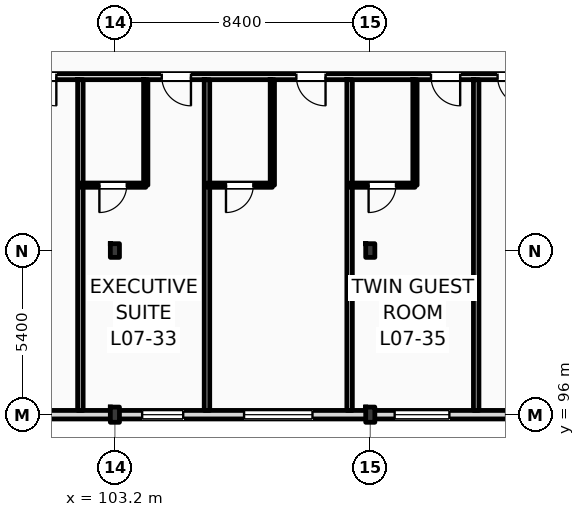
"""IFC4 building model, lengths in metres.
Left out: names, types, materials, properties, quantities, classifications, styles, units other than length and angle.
Written with IfcOpenShell. Run it as: python <this file> out.ifc"""

import sys

from ifc_helpers import new_model, si_unit, direction, frame, frame_2d, origin, origin_2d, place, context, subcontext, project, spatial, rectangle, i_section, extrude, element, fill, save


model = new_model("IFC4")
c1 = context("Model", 3, precision=1e-05, world=origin(), true_north=direction((0.0, 1.0)))
c2 = subcontext(c1, "Body", "Model", "MODEL_VIEW")
j1 = project(units=[si_unit("LENGTHUNIT", "METRE"), si_unit("PLANEANGLEUNIT", "RADIAN")], contexts=[c1])
p1 = place(None, origin())
s1 = spatial("IfcSite", under=j1, at=p1, CompositionType="ELEMENT")
p2 = place(p1, origin())
s2 = spatial("IfcBuilding", under=s1, at=p2, CompositionType="ELEMENT")
p3 = place(p2, frame((0.0, 0.0, 31.8)))
s3 = spatial("IfcBuildingStorey", under=s2, at=p3, CompositionType="ELEMENT", Elevation=31.8)
p4 = place(p3, frame((103.2, 96.0, 0.0), z_axis=(0.0, 0.0, 1.0), x_axis=(1.0, 0.0, 0.0)))
e1 = element("IfcColumn", 1, at=p4, inside=s3, PredefinedType="COLUMN", context=c2, shape_type="SweptSolid", body=[
    extrude(i_section(OverallWidth=0.3, OverallDepth=0.5, WebThickness=0.014, FlangeThickness=0.028, FilletRadius=0.027, at=origin_2d()), origin(), (0.0, 0.0, 1.0), 3.6),
])
p5 = place(p3, frame((103.2, 101.4, 0.0), z_axis=(0.0, 0.0, 1.0), x_axis=(1.0, 0.0, 0.0)))
e2 = element("IfcColumn", 2, at=p5, inside=s3, PredefinedType="COLUMN", context=c2, shape_type="SweptSolid", body=[
    extrude(i_section(OverallWidth=0.3, OverallDepth=0.45, WebThickness=0.014, FlangeThickness=0.026, FilletRadius=0.027, at=origin_2d()), origin(), (0.0, 0.0, 1.0), 3.6),
])
p6 = place(p3, frame((111.6, 96.0, 0.0), z_axis=(0.0, 0.0, 1.0), x_axis=(1.0, 0.0, 0.0)))
e3 = element("IfcColumn", 3, at=p6, inside=s3, PredefinedType="COLUMN", context=c2, shape_type="SweptSolid", body=[
    extrude(i_section(OverallWidth=0.3, OverallDepth=0.5, WebThickness=0.014, FlangeThickness=0.028, FilletRadius=0.027, at=origin_2d()), origin(), (0.0, 0.0, 1.0), 3.6),
])
p7 = place(p3, frame((111.6, 101.4, 0.0), z_axis=(0.0, 0.0, 1.0), x_axis=(1.0, 0.0, 0.0)))
e4 = element("IfcColumn", 4, at=p7, inside=s3, PredefinedType="COLUMN", context=c2, shape_type="SweptSolid", body=[
    extrude(i_section(OverallWidth=0.3, OverallDepth=0.45, WebThickness=0.014, FlangeThickness=0.026, FilletRadius=0.027, at=origin_2d()), origin(), (0.0, 0.0, 1.0), 3.6),
])
p8 = place(p3, frame((25.2, 96.0, 0.0), z_axis=(0.0, 0.0, 1.0), x_axis=(1.0, 0.0, 0.0)))
e5 = element("IfcWall", 5, at=p8, inside=s3, PredefinedType="STANDARD", context=c2, shape_type="SweptSolid", body=[
    extrude(rectangle(XDim=94.8, YDim=0.28, at=frame_2d((47.4, 0.0))), origin(), (0.0, 0.0, 1.0), 2.72),
])
p9 = place(p8, frame((16.394, 0.0, 0.9)))
e6 = element("IfcOpeningElement", 6, at=p9, cuts=e5, PredefinedType="OPENING", context=c2, shape_type="SweptSolid", body=[
    extrude(rectangle(XDim=2.0, YDim=1.64, at=frame_2d((1.0, 0.82))), frame((0.0, 0.15, 0.0), z_axis=(0.0, -1.0, 0.0), x_axis=(1.0, 0.0, 0.0)), (0.0, 0.0, 1.0), 0.3),
])
p10 = place(p8, frame((20.207, 0.0, 0.9)))
e7 = element("IfcOpeningElement", 7, at=p10, cuts=e5, PredefinedType="OPENING", context=c2, shape_type="SweptSolid", body=[
    extrude(rectangle(XDim=2.3, YDim=1.64, at=frame_2d((1.15, 0.82))), frame((0.0, 0.15, 0.0), z_axis=(0.0, -1.0, 0.0), x_axis=(1.0, 0.0, 0.0)), (0.0, 0.0, 1.0), 0.3),
])
p11 = place(p8, frame((24.287, 0.0, 0.9)))
e8 = element("IfcOpeningElement", 8, at=p11, cuts=e5, PredefinedType="OPENING", context=c2, shape_type="SweptSolid", body=[
    extrude(rectangle(XDim=2.358, YDim=1.64, at=frame_2d((1.179, 0.82))), frame((0.0, 0.15, 0.0), z_axis=(0.0, -1.0, 0.0), x_axis=(1.0, 0.0, 0.0)), (0.0, 0.0, 1.0), 0.3),
])
p12 = place(p8, frame((27.665, 0.0, 0.9)))
e9 = element("IfcOpeningElement", 9, at=p12, cuts=e5, PredefinedType="OPENING", context=c2, shape_type="SweptSolid", body=[
    extrude(rectangle(XDim=1.8, YDim=1.64, at=frame_2d((0.9, 0.82))), frame((0.0, 0.15, 0.0), z_axis=(0.0, -1.0, 0.0), x_axis=(1.0, 0.0, 0.0)), (0.0, 0.0, 1.0), 0.3),
])
p13 = place(p8, frame((32.103, 0.0, 0.9)))
e10 = element("IfcOpeningElement", 10, at=p13, cuts=e5, PredefinedType="OPENING", context=c2, shape_type="SweptSolid", body=[
    extrude(rectangle(XDim=2.359, YDim=1.64, at=frame_2d((1.179, 0.82))), frame((0.0, 0.15, 0.0), z_axis=(0.0, -1.0, 0.0), x_axis=(1.0, 0.0, 0.0)), (0.0, 0.0, 1.0), 0.3),
])
p14 = place(p8, frame((36.336, 0.0, 0.9)))
e11 = element("IfcOpeningElement", 11, at=p14, cuts=e5, PredefinedType="OPENING", context=c2, shape_type="SweptSolid", body=[
    extrude(rectangle(XDim=1.2, YDim=1.64, at=frame_2d((0.6, 0.82))), frame((0.0, 0.15, 0.0), z_axis=(0.0, -1.0, 0.0), x_axis=(1.0, 0.0, 0.0)), (0.0, 0.0, 1.0), 0.3),
])
p15 = place(p8, frame((56.177, 0.0, 0.9)))
e12 = element("IfcOpeningElement", 12, at=p15, cuts=e5, PredefinedType="OPENING", context=c2, shape_type="SweptSolid", body=[
    extrude(rectangle(XDim=1.35, YDim=1.64, at=frame_2d((0.675, 0.82))), frame((0.0, 0.15, 0.0), z_axis=(0.0, -1.0, 0.0), x_axis=(1.0, 0.0, 0.0)), (0.0, 0.0, 1.0), 0.3),
])
p16 = place(p8, frame((60.086, 0.0, 0.9)))
e13 = element("IfcOpeningElement", 13, at=p16, cuts=e5, PredefinedType="OPENING", context=c2, shape_type="SweptSolid", body=[
    extrude(rectangle(XDim=1.5, YDim=1.64, at=frame_2d((0.75, 0.82))), frame((0.0, 0.15, 0.0), z_axis=(0.0, -1.0, 0.0), x_axis=(1.0, 0.0, 0.0)), (0.0, 0.0, 1.0), 0.3),
])
p17 = place(p8, frame((64.838, 0.0, 0.9)))
e14 = element("IfcOpeningElement", 14, at=p17, cuts=e5, PredefinedType="OPENING", context=c2, shape_type="SweptSolid", body=[
    extrude(rectangle(XDim=1.65, YDim=1.64, at=frame_2d((0.825, 0.82))), frame((0.0, 0.15, 0.0), z_axis=(0.0, -1.0, 0.0), x_axis=(1.0, 0.0, 0.0)), (0.0, 0.0, 1.0), 0.3),
])
p18 = place(p8, frame((68.419, 0.0, 0.9)))
e15 = element("IfcOpeningElement", 15, at=p18, cuts=e5, PredefinedType="OPENING", context=c2, shape_type="SweptSolid", body=[
    extrude(rectangle(XDim=0.9, YDim=1.64, at=frame_2d((0.45, 0.82))), frame((0.0, 0.15, 0.0), z_axis=(0.0, -1.0, 0.0), x_axis=(1.0, 0.0, 0.0)), (0.0, 0.0, 1.0), 0.3),
])
p19 = place(p8, frame((73.544, 0.0, 0.9)))
e16 = element("IfcOpeningElement", 16, at=p19, cuts=e5, PredefinedType="OPENING", context=c2, shape_type="SweptSolid", body=[
    extrude(rectangle(XDim=1.95, YDim=1.64, at=frame_2d((0.975, 0.82))), frame((0.0, 0.15, 0.0), z_axis=(0.0, -1.0, 0.0), x_axis=(1.0, 0.0, 0.0)), (0.0, 0.0, 1.0), 0.3),
])
p20 = place(p8, frame((78.897, 0.0, 0.9)))
e17 = element("IfcOpeningElement", 17, at=p20, cuts=e5, PredefinedType="OPENING", context=c2, shape_type="SweptSolid", body=[
    extrude(rectangle(XDim=1.35, YDim=1.64, at=frame_2d((0.675, 0.82))), frame((0.0, 0.15, 0.0), z_axis=(0.0, -1.0, 0.0), x_axis=(1.0, 0.0, 0.0)), (0.0, 0.0, 1.0), 0.3),
])
p21 = place(p8, frame((82.249, 0.0, 0.9)))
e18 = element("IfcOpeningElement", 18, at=p21, cuts=e5, PredefinedType="OPENING", context=c2, shape_type="SweptSolid", body=[
    extrude(rectangle(XDim=2.25, YDim=1.64, at=frame_2d((1.125, 0.82))), frame((0.0, 0.15, 0.0), z_axis=(0.0, -1.0, 0.0), x_axis=(1.0, 0.0, 0.0)), (0.0, 0.0, 1.0), 0.3),
])
p22 = place(p8, frame((87.202, 0.0, 0.9)))
e19 = element("IfcOpeningElement", 19, at=p22, cuts=e5, PredefinedType="OPENING", context=c2, shape_type="SweptSolid", body=[
    extrude(rectangle(XDim=1.8, YDim=1.64, at=frame_2d((0.9, 0.82))), frame((0.0, 0.15, 0.0), z_axis=(0.0, -1.0, 0.0), x_axis=(1.0, 0.0, 0.0)), (0.0, 0.0, 1.0), 0.3),
])
p23 = place(p8, frame((90.867, 0.0, 0.9)))
e20 = element("IfcOpeningElement", 20, at=p23, cuts=e5, PredefinedType="OPENING", context=c2, shape_type="SweptSolid", body=[
    extrude(rectangle(XDim=2.55, YDim=1.64, at=frame_2d((1.275, 0.82))), frame((0.0, 0.15, 0.0), z_axis=(0.0, -1.0, 0.0), x_axis=(1.0, 0.0, 0.0)), (0.0, 0.0, 1.0), 0.3),
])
p24 = place(p3, frame((79.76, 107.12, 0.0), z_axis=(0.0, 0.0, 1.0), x_axis=(1.0, 0.0, 0.0)))
e21 = element("IfcWall", 21, at=p24, inside=s3, PredefinedType="PARTITIONING", context=c2, shape_type="SweptSolid", body=[
    extrude(rectangle(XDim=40.1, YDim=0.2, at=frame_2d((20.05, 0.0))), origin(), (0.0, 0.0, 1.0), 3.36),
])
p25 = place(p24, frame((2.887, 0.0, 0.0)))
e22 = element("IfcOpeningElement", 22, at=p25, cuts=e21, PredefinedType="OPENING", context=c2, shape_type="SweptSolid", body=[
    extrude(rectangle(XDim=0.96, YDim=2.2, at=frame_2d((0.48, 1.1))), frame((0.0, 0.11, 0.0), z_axis=(0.0, -1.0, 0.0), x_axis=(1.0, 0.0, 0.0)), (0.0, 0.0, 1.0), 0.22),
])
p26 = place(p24, frame((5.121, 0.0, 0.0)))
e23 = element("IfcOpeningElement", 23, at=p26, cuts=e21, PredefinedType="OPENING", context=c2, shape_type="SweptSolid", body=[
    extrude(rectangle(XDim=0.96, YDim=2.2, at=frame_2d((0.48, 1.1))), frame((0.0, 0.11, 0.0), z_axis=(0.0, -1.0, 0.0), x_axis=(1.0, 0.0, 0.0)), (0.0, 0.0, 1.0), 0.22),
])
p27 = place(p24, frame((11.698, 0.0, 0.0)))
e24 = element("IfcOpeningElement", 24, at=p27, cuts=e21, PredefinedType="OPENING", context=c2, shape_type="SweptSolid", body=[
    extrude(rectangle(XDim=0.96, YDim=2.2, at=frame_2d((0.48, 1.1))), frame((0.0, 0.11, 0.0), z_axis=(0.0, -1.0, 0.0), x_axis=(1.0, 0.0, 0.0)), (0.0, 0.0, 1.0), 0.22),
])
p28 = place(p24, frame((13.976, 0.0, 0.0)))
e25 = element("IfcOpeningElement", 25, at=p28, cuts=e21, PredefinedType="OPENING", context=c2, shape_type="SweptSolid", body=[
    extrude(rectangle(XDim=0.96, YDim=2.2, at=frame_2d((0.48, 1.1))), frame((0.0, 0.11, 0.0), z_axis=(0.0, -1.0, 0.0), x_axis=(1.0, 0.0, 0.0)), (0.0, 0.0, 1.0), 0.22),
])
p29 = place(p24, frame((20.554, 0.0, 0.0)))
e26 = element("IfcOpeningElement", 26, at=p29, cuts=e21, PredefinedType="OPENING", context=c2, shape_type="SweptSolid", body=[
    extrude(rectangle(XDim=0.96, YDim=2.2, at=frame_2d((0.48, 1.1))), frame((0.0, 0.11, 0.0), z_axis=(0.0, -1.0, 0.0), x_axis=(1.0, 0.0, 0.0)), (0.0, 0.0, 1.0), 0.22),
])
p30 = place(p24, frame((24.982, 0.0, 0.0)))
e27 = element("IfcOpeningElement", 27, at=p30, cuts=e21, PredefinedType="OPENING", context=c2, shape_type="SweptSolid", body=[
    extrude(rectangle(XDim=0.96, YDim=2.2, at=frame_2d((0.48, 1.1))), frame((0.0, 0.11, 0.0), z_axis=(0.0, -1.0, 0.0), x_axis=(1.0, 0.0, 0.0)), (0.0, 0.0, 1.0), 0.22),
])
p31 = place(p24, frame((29.409, 0.0, 0.0)))
e28 = element("IfcOpeningElement", 28, at=p31, cuts=e21, PredefinedType="OPENING", context=c2, shape_type="SweptSolid", body=[
    extrude(rectangle(XDim=0.96, YDim=2.2, at=frame_2d((0.48, 1.1))), frame((0.0, 0.11, 0.0), z_axis=(0.0, -1.0, 0.0), x_axis=(1.0, 0.0, 0.0)), (0.0, 0.0, 1.0), 0.22),
])
p32 = place(p24, frame((33.837, 0.0, 0.0)))
e29 = element("IfcOpeningElement", 29, at=p32, cuts=e21, PredefinedType="OPENING", context=c2, shape_type="SweptSolid", body=[
    extrude(rectangle(XDim=0.96, YDim=2.2, at=frame_2d((0.48, 1.1))), frame((0.0, 0.11, 0.0), z_axis=(0.0, -1.0, 0.0), x_axis=(1.0, 0.0, 0.0)), (0.0, 0.0, 1.0), 0.22),
])
p33 = place(p24, frame((36.027, 0.0, 0.0)))
e30 = element("IfcOpeningElement", 30, at=p33, cuts=e21, PredefinedType="OPENING", context=c2, shape_type="SweptSolid", body=[
    extrude(rectangle(XDim=0.96, YDim=2.2, at=frame_2d((0.48, 1.1))), frame((0.0, 0.11, 0.0), z_axis=(0.0, -1.0, 0.0), x_axis=(1.0, 0.0, 0.0)), (0.0, 0.0, 1.0), 0.22),
])
p34 = place(p3, frame((102.065, 96.14, 0.0), z_axis=(0.0, 0.0, 1.0), x_axis=(0.0, 1.0, 0.0)))
e31 = element("IfcWall", 31, at=p34, inside=s3, PredefinedType="PARTITIONING", context=c2, shape_type="SweptSolid", body=[
    extrude(rectangle(XDim=10.88, YDim=0.18, at=frame_2d((5.44, 0.0))), origin(), (0.0, 0.0, 1.0), 3.36),
])
p35 = place(p3, frame((106.229, 96.14, 0.0), z_axis=(0.0, 0.0, 1.0), x_axis=(0.0, 1.0, 0.0)))
e32 = element("IfcWall", 32, at=p35, inside=s3, PredefinedType="PARTITIONING", context=c2, shape_type="SweptSolid", body=[
    extrude(rectangle(XDim=10.88, YDim=0.18, at=frame_2d((5.44, 0.0))), origin(), (0.0, 0.0, 1.0), 2.97),
])
p36 = place(p3, frame((104.215, 103.55, 0.0), z_axis=(0.0, 0.0, 1.0), x_axis=(0.0, 1.0, 0.0)))
e33 = element("IfcWall", 33, at=p36, inside=s3, PredefinedType="PARTITIONING", context=c2, shape_type="SweptSolid", body=[
    extrude(rectangle(XDim=3.47, YDim=0.14, at=frame_2d((1.735, 0.0))), origin(), (0.0, 0.0, 1.0), 3.36),
])
p37 = place(p3, frame((102.065, 103.55, 0.0), z_axis=(0.0, 0.0, 1.0), x_axis=(1.0, 0.0, 0.0)))
e34 = element("IfcWall", 34, at=p37, inside=s3, PredefinedType="PARTITIONING", context=c2, shape_type="SweptSolid", body=[
    extrude(rectangle(XDim=2.15, YDim=0.14, at=frame_2d((1.075, 0.0))), origin(), (0.0, 0.0, 1.0), 3.36),
])
p38 = place(p37, frame((0.625, 0.0, 0.0)))
e35 = element("IfcOpeningElement", 35, at=p38, cuts=e34, PredefinedType="OPENING", context=c2, shape_type="SweptSolid", body=[
    extrude(rectangle(XDim=0.9, YDim=2.1, at=frame_2d((0.45, 1.05))), frame((0.0, 0.08, 0.0), z_axis=(0.0, -1.0, 0.0), x_axis=(1.0, 0.0, 0.0)), (0.0, 0.0, 1.0), 0.16),
])
p39 = place(p3, frame((110.92, 96.14, 0.0), z_axis=(0.0, 0.0, 1.0), x_axis=(0.0, 1.0, 0.0)))
e36 = element("IfcWall", 36, at=p39, inside=s3, PredefinedType="PARTITIONING", context=c2, shape_type="SweptSolid", body=[
    extrude(rectangle(XDim=10.88, YDim=0.18, at=frame_2d((5.44, 0.0))), origin(), (0.0, 0.0, 1.0), 3.36),
])
p40 = place(p3, frame((108.379, 103.55, 0.0), z_axis=(0.0, 0.0, 1.0), x_axis=(0.0, 1.0, 0.0)))
e37 = element("IfcWall", 37, at=p40, inside=s3, PredefinedType="PARTITIONING", context=c2, shape_type="SweptSolid", body=[
    extrude(rectangle(XDim=3.47, YDim=0.14, at=frame_2d((1.735, 0.0))), origin(), (0.0, 0.0, 1.0), 3.36),
])
p41 = place(p3, frame((106.229, 103.55, 0.0), z_axis=(0.0, 0.0, 1.0), x_axis=(1.0, 0.0, 0.0)))
e38 = element("IfcWall", 38, at=p41, inside=s3, PredefinedType="PARTITIONING", context=c2, shape_type="SweptSolid", body=[
    extrude(rectangle(XDim=2.15, YDim=0.14, at=frame_2d((1.075, 0.0))), origin(), (0.0, 0.0, 1.0), 3.36),
])
p42 = place(p41, frame((0.625, 0.0, 0.0)))
e39 = element("IfcOpeningElement", 39, at=p42, cuts=e38, PredefinedType="OPENING", context=c2, shape_type="SweptSolid", body=[
    extrude(rectangle(XDim=0.9, YDim=2.1, at=frame_2d((0.45, 1.05))), frame((0.0, 0.08, 0.0), z_axis=(0.0, -1.0, 0.0), x_axis=(1.0, 0.0, 0.0)), (0.0, 0.0, 1.0), 0.16),
])
p43 = place(p3, frame((115.084, 96.14, 0.0), z_axis=(0.0, 0.0, 1.0), x_axis=(0.0, 1.0, 0.0)))
e40 = element("IfcWall", 40, at=p43, inside=s3, PredefinedType="PARTITIONING", context=c2, shape_type="SweptSolid", body=[
    extrude(rectangle(XDim=10.88, YDim=0.18, at=frame_2d((5.44, 0.0))), origin(), (0.0, 0.0, 1.0), 3.36),
])
p44 = place(p3, frame((113.07, 103.55, 0.0), z_axis=(0.0, 0.0, 1.0), x_axis=(0.0, 1.0, 0.0)))
e41 = element("IfcWall", 41, at=p44, inside=s3, PredefinedType="PARTITIONING", context=c2, shape_type="SweptSolid", body=[
    extrude(rectangle(XDim=3.47, YDim=0.14, at=frame_2d((1.735, 0.0))), origin(), (0.0, 0.0, 1.0), 3.36),
])
p45 = place(p3, frame((110.92, 103.55, 0.0), z_axis=(0.0, 0.0, 1.0), x_axis=(1.0, 0.0, 0.0)))
e42 = element("IfcWall", 42, at=p45, inside=s3, PredefinedType="PARTITIONING", context=c2, shape_type="SweptSolid", body=[
    extrude(rectangle(XDim=2.15, YDim=0.14, at=frame_2d((1.075, 0.0))), origin(), (0.0, 0.0, 1.0), 3.36),
])
p46 = place(p45, frame((0.625, 0.0, 0.0)))
e43 = element("IfcOpeningElement", 43, at=p46, cuts=e42, PredefinedType="OPENING", context=c2, shape_type="SweptSolid", body=[
    extrude(rectangle(XDim=0.9, YDim=2.1, at=frame_2d((0.45, 1.05))), frame((0.0, 0.08, 0.0), z_axis=(0.0, -1.0, 0.0), x_axis=(1.0, 0.0, 0.0)), (0.0, 0.0, 1.0), 0.16),
])
p47 = place(p20, origin())
e44 = element("IfcWindow", 44, at=p47, inside=s3, PartitioningType="DOUBLE_PANEL_VERTICAL", PredefinedType="WINDOW", context=c2, shape_type="SweptSolid", body=[
    extrude(rectangle(XDim=1.35, YDim=1.64, at=frame_2d((0.675, 0.82))), frame((0.0, 0.03, 0.0), z_axis=(0.0, -1.0, 0.0), x_axis=(1.0, 0.0, 0.0)), (0.0, 0.0, 1.0), 0.06),
])
fill(e17, e44)
p48 = place(p21, origin())
e45 = element("IfcWindow", 45, at=p48, inside=s3, PartitioningType="DOUBLE_PANEL_VERTICAL", PredefinedType="WINDOW", context=c2, shape_type="SweptSolid", body=[
    extrude(rectangle(XDim=2.25, YDim=1.64, at=frame_2d((1.125, 0.82))), frame((0.0, 0.03, 0.0), z_axis=(0.0, -1.0, 0.0), x_axis=(1.0, 0.0, 0.0)), (0.0, 0.0, 1.0), 0.06),
])
fill(e18, e45)
p49 = place(p22, origin())
e46 = element("IfcWindow", 46, at=p49, inside=s3, PartitioningType="DOUBLE_PANEL_VERTICAL", PredefinedType="WINDOW", context=c2, shape_type="SweptSolid", body=[
    extrude(rectangle(XDim=1.8, YDim=1.64, at=frame_2d((0.9, 0.82))), frame((0.0, 0.03, 0.0), z_axis=(0.0, -1.0, 0.0), x_axis=(1.0, 0.0, 0.0)), (0.0, 0.0, 1.0), 0.06),
])
fill(e19, e46)
p50 = place(p29, frame((0.96, 0.0, 0.0), z_axis=(0.0, 0.0, 1.0), x_axis=(-1.0, 0.0, 0.0)))
e47 = element("IfcDoor", 47, at=p50, inside=s3, OperationType="SINGLE_SWING_RIGHT", PredefinedType="DOOR", context=c2, shape_type="SweptSolid", body=[
    extrude(rectangle(XDim=0.96, YDim=2.2, at=frame_2d((0.48, 1.1))), frame((0.0, 0.025, 0.0), z_axis=(0.0, -1.0, 0.0), x_axis=(1.0, 0.0, 0.0)), (0.0, 0.0, 1.0), 0.05),
])
fill(e26, e47)
p51 = place(p30, frame((0.96, 0.0, 0.0), z_axis=(0.0, 0.0, 1.0), x_axis=(-1.0, 0.0, 0.0)))
e48 = element("IfcDoor", 48, at=p51, inside=s3, OperationType="SINGLE_SWING_RIGHT", PredefinedType="DOOR", context=c2, shape_type="SweptSolid", body=[
    extrude(rectangle(XDim=0.96, YDim=2.2, at=frame_2d((0.48, 1.1))), frame((0.0, 0.025, 0.0), z_axis=(0.0, -1.0, 0.0), x_axis=(1.0, 0.0, 0.0)), (0.0, 0.0, 1.0), 0.05),
])
fill(e27, e48)
p52 = place(p38, frame((0.9, 0.0, 0.0), z_axis=(0.0, 0.0, 1.0), x_axis=(-1.0, 0.0, 0.0)))
e49 = element("IfcDoor", 49, at=p52, inside=s3, OperationType="SINGLE_SWING_LEFT", PredefinedType="DOOR", context=c2, shape_type="SweptSolid", body=[
    extrude(rectangle(XDim=0.9, YDim=2.1, at=frame_2d((0.45, 1.05))), frame((0.0, 0.025, 0.0), z_axis=(0.0, -1.0, 0.0), x_axis=(1.0, 0.0, 0.0)), (0.0, 0.0, 1.0), 0.05),
])
fill(e35, e49)
p53 = place(p31, frame((0.96, 0.0, 0.0), z_axis=(0.0, 0.0, 1.0), x_axis=(-1.0, 0.0, 0.0)))
e50 = element("IfcDoor", 50, at=p53, inside=s3, OperationType="SINGLE_SWING_RIGHT", PredefinedType="DOOR", context=c2, shape_type="SweptSolid", body=[
    extrude(rectangle(XDim=0.96, YDim=2.2, at=frame_2d((0.48, 1.1))), frame((0.0, 0.025, 0.0), z_axis=(0.0, -1.0, 0.0), x_axis=(1.0, 0.0, 0.0)), (0.0, 0.0, 1.0), 0.05),
])
fill(e28, e50)
p54 = place(p42, frame((0.9, 0.0, 0.0), z_axis=(0.0, 0.0, 1.0), x_axis=(-1.0, 0.0, 0.0)))
e51 = element("IfcDoor", 51, at=p54, inside=s3, OperationType="SINGLE_SWING_LEFT", PredefinedType="DOOR", context=c2, shape_type="SweptSolid", body=[
    extrude(rectangle(XDim=0.9, YDim=2.1, at=frame_2d((0.45, 1.05))), frame((0.0, 0.025, 0.0), z_axis=(0.0, -1.0, 0.0), x_axis=(1.0, 0.0, 0.0)), (0.0, 0.0, 1.0), 0.05),
])
fill(e39, e51)
p55 = place(p32, frame((0.96, 0.0, 0.0), z_axis=(0.0, 0.0, 1.0), x_axis=(-1.0, 0.0, 0.0)))
e52 = element("IfcDoor", 52, at=p55, inside=s3, OperationType="SINGLE_SWING_RIGHT", PredefinedType="DOOR", context=c2, shape_type="SweptSolid", body=[
    extrude(rectangle(XDim=0.96, YDim=2.2, at=frame_2d((0.48, 1.1))), frame((0.0, 0.025, 0.0), z_axis=(0.0, -1.0, 0.0), x_axis=(1.0, 0.0, 0.0)), (0.0, 0.0, 1.0), 0.05),
])
fill(e29, e52)
p56 = place(p46, frame((0.9, 0.0, 0.0), z_axis=(0.0, 0.0, 1.0), x_axis=(-1.0, 0.0, 0.0)))
e53 = element("IfcDoor", 53, at=p56, inside=s3, OperationType="SINGLE_SWING_LEFT", PredefinedType="DOOR", context=c2, shape_type="SweptSolid", body=[
    extrude(rectangle(XDim=0.9, YDim=2.1, at=frame_2d((0.45, 1.05))), frame((0.0, 0.025, 0.0), z_axis=(0.0, -1.0, 0.0), x_axis=(1.0, 0.0, 0.0)), (0.0, 0.0, 1.0), 0.05),
])
fill(e43, e53)
p57 = place(p33, frame((0.96, 0.0, 0.0), z_axis=(0.0, 0.0, 1.0), x_axis=(-1.0, 0.0, 0.0)))
e54 = element("IfcDoor", 54, at=p57, inside=s3, OperationType="SINGLE_SWING_RIGHT", PredefinedType="DOOR", context=c2, shape_type="SweptSolid", body=[
    extrude(rectangle(XDim=0.96, YDim=2.2, at=frame_2d((0.48, 1.1))), frame((0.0, 0.025, 0.0), z_axis=(0.0, -1.0, 0.0), x_axis=(1.0, 0.0, 0.0)), (0.0, 0.0, 1.0), 0.05),
])
fill(e30, e54)
save(model, sys.argv[1])
